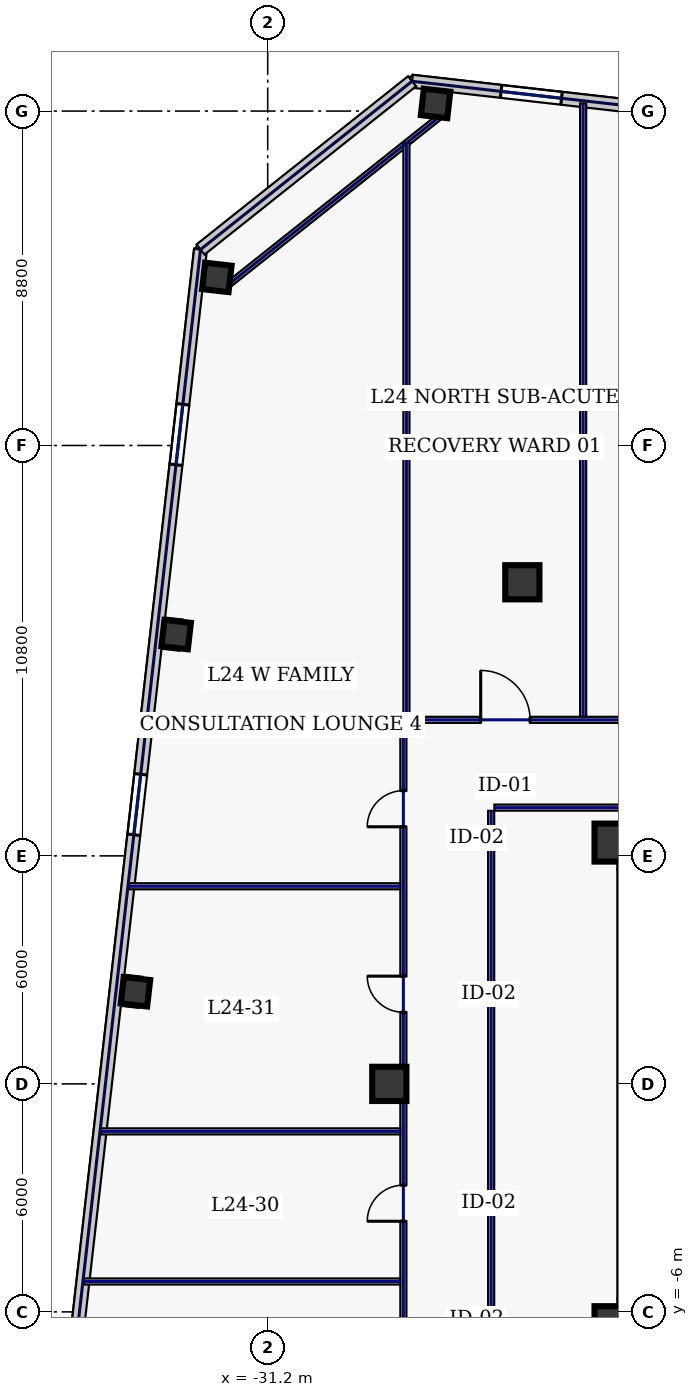
"""IFC4 building model, lengths in metres.
Left out: names, types, materials, properties, quantities, classifications, styles, units other than length and angle.
Written with IfcOpenShell. Run it as: python <this file> out.ifc"""

import sys

from ifc_helpers import new_model, si_unit, direction, frame, frame_2d, origin, origin_2d, place, context, subcontext, project, spatial, rectangle, hollow_rectangle, extrude, element, fill, save


model = new_model("IFC4")
c1 = context("Model", 3, precision=1e-05, world=origin(), true_north=direction((0.0, 1.0)))
c2 = subcontext(c1, "Body", "Model", "MODEL_VIEW")
j1 = project(units=[si_unit("LENGTHUNIT", "METRE"), si_unit("PLANEANGLEUNIT", "RADIAN")], contexts=[c1])
p1 = place(None, origin())
s1 = spatial("IfcSite", under=j1, at=p1, CompositionType="ELEMENT")
p2 = place(p1, origin())
s2 = spatial("IfcBuilding", under=s1, at=p2, CompositionType="ELEMENT")
p3 = place(p2, frame((0.0, 0.0, 109.4)))
s3 = spatial("IfcBuildingStorey", under=s2, at=p3, CompositionType="ELEMENT", Elevation=109.4)
for number, where, z_axis, x_axis in (
    (1, (-22.0, 6.0, 0.0), (0.0, 0.0, 1.0), (1.0, 0.0, 0.0)),
    (2, (-22.0, -6.0, 0.0), (0.0, 0.0, 1.0), (1.0, 0.0, 0.0)),
):
    element("IfcWall", number, at=place(p3, frame(where, z_axis=z_axis, x_axis=x_axis)), inside=s3, PredefinedType="SHEAR", context=c2, shape_type="SweptSolid", body=[
        extrude(rectangle(XDim=11.55, YDim=0.7, at=frame_2d((5.775, 0.0))), origin(), (0.0, 0.0, 1.0), 3.74),
    ])
p4 = place(p3, frame((-21.6, -5.65, 0.0), z_axis=(0.0, 0.0, 1.0), x_axis=(0.0, 1.0, 0.0)))
e3 = element("IfcWall", 3, at=p4, inside=s3, PredefinedType="SHEAR", context=c2, shape_type="SweptSolid", body=[
    extrude(rectangle(XDim=11.3, YDim=0.8, at=frame_2d((5.65, 0.0))), origin(), (0.0, 0.0, 1.0), 3.74),
])
for number, where, z_axis, x_axis in (
    (4, (-22.1, -6.35, 0.0), (0.0, 0.0, 1.0), (1.0, 0.0, 0.0)),
    (5, (-22.1, 6.35, 0.0), (0.0, 0.0, 1.0), (1.0, 0.0, 0.0)),
):
    element("IfcColumn", number, at=place(p3, frame(where, z_axis=z_axis, x_axis=x_axis)), inside=s3, PredefinedType="COLUMN", context=c2, shape_type="SweptSolid", body=[
        extrude(hollow_rectangle(XDim=1.0, YDim=1.0, WallThickness=0.045, at=origin_2d()), origin(), (0.0, 0.0, 1.0), 3.74),
    ])
for number, where, z_axis, x_axis in (
    (6, (-24.5, 13.2, 0.0), (0.0, 0.0, 1.0), (1.0, 0.0, 0.0)),
    (7, (-28.0, 0.0, 0.0), (0.0, 0.0, 1.0), (1.0, 0.0, 0.0)),
):
    element("IfcColumn", number, at=place(p3, frame(where, z_axis=z_axis, x_axis=x_axis)), inside=s3, PredefinedType="COLUMN", context=c2, shape_type="SweptSolid", body=[
        extrude(hollow_rectangle(XDim=0.9, YDim=0.9, WallThickness=0.04, at=origin_2d()), origin(), (0.0, 0.0, 1.0), 3.74),
    ])
for number, where, z_axis, x_axis in (
    (8, (-26.783, 25.801, 0.0), (0.0, 0.0, 1.0), (0.994, -0.113, 0.0)),
    (9, (-32.538, 21.223, 0.0), (0.0, 0.0, 1.0), (0.994, -0.113, 0.0)),
    (10, (-33.609, 11.824, 0.0), (0.0, 0.0, 1.0), (0.994, -0.113, 0.0)),
    (11, (-34.68, 2.425, 0.0), (0.0, 0.0, 1.0), (0.994, -0.113, 0.0)),
):
    element("IfcColumn", number, at=place(p3, frame(where, z_axis=z_axis, x_axis=x_axis)), inside=s3, PredefinedType="COLUMN", context=c2, shape_type="SweptSolid", body=[
        extrude(hollow_rectangle(XDim=0.7, YDim=0.7, WallThickness=0.032, at=origin_2d()), origin(), (0.0, 0.0, 1.0), 3.74),
    ])
p5 = place(p3, frame((-6.314, 23.982, 0.0), z_axis=(0.0, 0.0, 1.0), x_axis=(-0.993571362037, 0.113207546299, 0.0)))
e12 = element("IfcWall", 12, at=p5, inside=s3, PredefinedType="STANDARD", context=c2, shape_type="SweptSolid", body=[
    extrude(rectangle(XDim=21.223, YDim=0.34, at=frame_2d((10.611, 0.0))), origin(), (0.0, 0.0, 1.0), 3.74),
])
p6 = place(p5, frame((17.265, 0.0, 0.22)))
e13 = element("IfcOpeningElement", 13, at=p6, cuts=e12, PredefinedType="OPENING", context=c2, shape_type="SweptSolid", body=[
    extrude(rectangle(XDim=1.6, YDim=1.2, at=frame_2d((0.8, 0.6))), frame((0.0, 0.18, 0.0), z_axis=(0.0, -1.0, 0.0), x_axis=(1.0, 0.0, 0.0)), (0.0, 0.0, 1.0), 0.36),
])
p7 = place(p5, frame((13.044, 0.0, 0.22)))
e14 = element("IfcOpeningElement", 14, at=p7, cuts=e12, PredefinedType="OPENING", context=c2, shape_type="SweptSolid", body=[
    extrude(rectangle(XDim=1.6, YDim=1.2, at=frame_2d((0.8, 0.6))), frame((0.0, 0.18, 0.0), z_axis=(0.0, -1.0, 0.0), x_axis=(1.0, 0.0, 0.0)), (0.0, 0.0, 1.0), 0.36),
])
p8 = place(p5, frame((8.088, 0.0, 0.22)))
e15 = element("IfcOpeningElement", 15, at=p8, cuts=e12, PredefinedType="OPENING", context=c2, shape_type="SweptSolid", body=[
    extrude(rectangle(XDim=1.6, YDim=1.2, at=frame_2d((0.8, 0.6))), frame((0.0, 0.18, 0.0), z_axis=(0.0, -1.0, 0.0), x_axis=(1.0, 0.0, 0.0)), (0.0, 0.0, 1.0), 0.36),
])
p9 = place(p5, frame((3.866, 0.0, 0.22)))
e16 = element("IfcOpeningElement", 16, at=p9, cuts=e12, PredefinedType="OPENING", context=c2, shape_type="SweptSolid", body=[
    extrude(rectangle(XDim=1.6, YDim=1.2, at=frame_2d((0.8, 0.6))), frame((0.0, 0.18, 0.0), z_axis=(0.0, -1.0, 0.0), x_axis=(1.0, 0.0, 0.0)), (0.0, 0.0, 1.0), 0.36),
])
p10 = place(p3, frame((-32.968, 21.957, 0.0), z_axis=(0.0, 0.0, 1.0), x_axis=(-0.113201605824, -0.993572038877, 0.0)))
e17 = element("IfcWall", 17, at=p10, inside=s3, PredefinedType="STANDARD", context=c2, shape_type="SweptSolid", body=[
    extrude(rectangle(XDim=39.2, YDim=0.34, at=frame_2d((19.6, 0.0))), origin(), (0.0, 0.0, 1.0), 3.74),
])
p11 = place(p10, frame((4.1, 0.0, 0.22)))
e18 = element("IfcOpeningElement", 18, at=p11, cuts=e17, PredefinedType="OPENING", context=c2, shape_type="SweptSolid", body=[
    extrude(rectangle(XDim=1.6, YDim=1.2, at=frame_2d((0.8, 0.6))), frame((0.0, 0.18, 0.0), z_axis=(0.0, -1.0, 0.0), x_axis=(1.0, 0.0, 0.0)), (0.0, 0.0, 1.0), 0.36),
])
p12 = place(p10, frame((13.9, 0.0, 0.22)))
e19 = element("IfcOpeningElement", 19, at=p12, cuts=e17, PredefinedType="OPENING", context=c2, shape_type="SweptSolid", body=[
    extrude(rectangle(XDim=1.6, YDim=1.2, at=frame_2d((0.8, 0.6))), frame((0.0, 0.18, 0.0), z_axis=(0.0, -1.0, 0.0), x_axis=(1.0, 0.0, 0.0)), (0.0, 0.0, 1.0), 0.36),
])
p13 = place(p10, frame((33.5, 0.0, 0.22)))
e20 = element("IfcOpeningElement", 20, at=p13, cuts=e17, PredefinedType="OPENING", context=c2, shape_type="SweptSolid", body=[
    extrude(rectangle(XDim=1.6, YDim=1.2, at=frame_2d((0.8, 0.6))), frame((0.0, 0.18, 0.0), z_axis=(0.0, -1.0, 0.0), x_axis=(1.0, 0.0, 0.0)), (0.0, 0.0, 1.0), 0.36),
])
p14 = place(p3, frame((-27.401, 26.385, 0.0), z_axis=(0.0, 0.0, 1.0), x_axis=(-0.78261359446, -0.622507800567, 0.0)))
e21 = element("IfcWall", 21, at=p14, inside=s3, PredefinedType="STANDARD", context=c2, shape_type="SweptSolid", body=[
    extrude(rectangle(XDim=7.114, YDim=0.34, at=frame_2d((3.557, 0.0))), origin(), (0.0, 0.0, 1.0), 3.74),
])
p15 = place(p3, frame((-26.571, 25.535, 0.0), z_axis=(0.0, 0.0, 1.0), x_axis=(-0.782617962887, -0.622502308564, 0.0)))
e22 = element("IfcWall", 22, at=p15, inside=s3, PredefinedType="PARTITIONING", context=c2, shape_type="SweptSolid", body=[
    extrude(rectangle(XDim=7.354, YDim=0.16, at=frame_2d((3.677, 0.0))), origin(), (0.0, 0.0, 1.0), 1.535),
])
p16 = place(p3, frame((-27.63, -9.215, 0.0), z_axis=(0.0, 0.0, 1.0), x_axis=(0.0, 1.0, 0.0)))
e23 = element("IfcWall", 23, at=p16, inside=s3, PredefinedType="PARTITIONING", context=c2, shape_type="SweptSolid", body=[
    extrude(rectangle(XDim=18.63, YDim=0.16, at=frame_2d((9.315, 0.0))), origin(), (0.0, 0.0, 1.0), 3.74),
])
p17 = place(p16, frame((1.769, 0.0, 0.0)))
e24 = element("IfcOpeningElement", 24, at=p17, cuts=e23, PredefinedType="OPENING", context=c2, shape_type="SweptSolid", body=[
    extrude(rectangle(XDim=0.95, YDim=2.2, at=frame_2d((0.475, 1.1))), frame((0.0, 0.09, 0.0), z_axis=(0.0, -1.0, 0.0), x_axis=(1.0, 0.0, 0.0)), (0.0, 0.0, 1.0), 0.18),
])
p18 = place(p16, frame((5.6, 0.0, 0.0)))
e25 = element("IfcOpeningElement", 25, at=p18, cuts=e23, PredefinedType="OPENING", context=c2, shape_type="SweptSolid", body=[
    extrude(rectangle(XDim=0.95, YDim=2.2, at=frame_2d((0.475, 1.1))), frame((0.0, 0.09, 0.0), z_axis=(0.0, -1.0, 0.0), x_axis=(1.0, 0.0, 0.0)), (0.0, 0.0, 1.0), 0.18),
])
p19 = place(p16, frame((11.1, 0.0, 0.0)))
e26 = element("IfcOpeningElement", 26, at=p19, cuts=e23, PredefinedType="OPENING", context=c2, shape_type="SweptSolid", body=[
    extrude(rectangle(XDim=0.95, YDim=2.2, at=frame_2d((0.475, 1.1))), frame((0.0, 0.09, 0.0), z_axis=(0.0, -1.0, 0.0), x_axis=(1.0, 0.0, 0.0)), (0.0, 0.0, 1.0), 0.18),
])
p20 = place(p16, frame((15.981, 0.0, 0.0)))
e27 = element("IfcOpeningElement", 27, at=p20, cuts=e23, PredefinedType="OPENING", context=c2, shape_type="SweptSolid", body=[
    extrude(rectangle(XDim=0.95, YDim=2.2, at=frame_2d((0.475, 1.1))), frame((0.0, 0.09, 0.0), z_axis=(0.0, -1.0, 0.0), x_axis=(1.0, 0.0, 0.0)), (0.0, 0.0, 1.0), 0.18),
])
p21 = place(p3, frame((-27.465, 9.58, 0.0), z_axis=(0.0, 0.0, 1.0), x_axis=(1.0, 0.0, 0.0)))
e28 = element("IfcWall", 28, at=p21, inside=s3, PredefinedType="PARTITIONING", context=c2, shape_type="SweptSolid", body=[
    extrude(rectangle(XDim=54.93, YDim=0.16, at=frame_2d((27.465, 0.0))), origin(), (0.0, 0.0, 1.0), 3.74),
])
p22 = place(p21, frame((1.869, 0.0, 0.0)))
e29 = element("IfcOpeningElement", 29, at=p22, cuts=e28, PredefinedType="OPENING", context=c2, shape_type="SweptSolid", body=[
    extrude(rectangle(XDim=1.3, YDim=2.2, at=frame_2d((0.65, 1.1))), frame((0.0, 0.09, 0.0), z_axis=(0.0, -1.0, 0.0), x_axis=(1.0, 0.0, 0.0)), (0.0, 0.0, 1.0), 0.18),
])
p23 = place(p21, frame((6.375, 0.0, 0.0)))
e30 = element("IfcOpeningElement", 30, at=p23, cuts=e28, PredefinedType="OPENING", context=c2, shape_type="SweptSolid", body=[
    extrude(rectangle(XDim=0.95, YDim=2.2, at=frame_2d((0.475, 1.1))), frame((0.0, 0.09, 0.0), z_axis=(0.0, -1.0, 0.0), x_axis=(1.0, 0.0, 0.0)), (0.0, 0.0, 1.0), 0.18),
])
p24 = place(p21, frame((13.1, 0.0, 0.0)))
e31 = element("IfcOpeningElement", 31, at=p24, cuts=e28, PredefinedType="OPENING", context=c2, shape_type="SweptSolid", body=[
    extrude(rectangle(XDim=1.3, YDim=2.2, at=frame_2d((0.65, 1.1))), frame((0.0, 0.09, 0.0), z_axis=(0.0, -1.0, 0.0), x_axis=(1.0, 0.0, 0.0)), (0.0, 0.0, 1.0), 0.18),
])
p25 = place(p21, frame((23.225, 0.0, 0.0)))
e32 = element("IfcOpeningElement", 32, at=p25, cuts=e28, PredefinedType="OPENING", context=c2, shape_type="SweptSolid", body=[
    extrude(rectangle(XDim=0.95, YDim=2.2, at=frame_2d((0.475, 1.1))), frame((0.0, 0.09, 0.0), z_axis=(0.0, -1.0, 0.0), x_axis=(1.0, 0.0, 0.0)), (0.0, 0.0, 1.0), 0.18),
])
p26 = place(p21, frame((33.725, 0.0, 0.0)))
e33 = element("IfcOpeningElement", 33, at=p26, cuts=e28, PredefinedType="OPENING", context=c2, shape_type="SweptSolid", body=[
    extrude(rectangle(XDim=0.95, YDim=2.2, at=frame_2d((0.475, 1.1))), frame((0.0, 0.09, 0.0), z_axis=(0.0, -1.0, 0.0), x_axis=(1.0, 0.0, 0.0)), (0.0, 0.0, 1.0), 0.18),
])
p27 = place(p21, frame((43.325, 0.0, 0.0)))
e34 = element("IfcOpeningElement", 34, at=p27, cuts=e28, PredefinedType="OPENING", context=c2, shape_type="SweptSolid", body=[
    extrude(rectangle(XDim=1.05, YDim=2.2, at=frame_2d((0.525, 1.1))), frame((0.0, 0.09, 0.0), z_axis=(0.0, -1.0, 0.0), x_axis=(1.0, 0.0, 0.0)), (0.0, 0.0, 1.0), 0.18),
])
p28 = place(p21, frame((50.781, 0.0, 0.0)))
e35 = element("IfcOpeningElement", 35, at=p28, cuts=e28, PredefinedType="OPENING", context=c2, shape_type="SweptSolid", body=[
    extrude(rectangle(XDim=1.3, YDim=2.2, at=frame_2d((0.65, 1.1))), frame((0.0, 0.09, 0.0), z_axis=(0.0, -1.0, 0.0), x_axis=(1.0, 0.0, 0.0)), (0.0, 0.0, 1.0), 0.18),
])
p29 = place(p3, frame((-10.665, 7.27, 0.0), z_axis=(0.0, 0.0, 1.0), x_axis=(-1.0, 0.0, 0.0)))
e36 = element("IfcWall", 36, at=p29, inside=s3, PredefinedType="PARTITIONING", context=c2, shape_type="SweptSolid", body=[
    extrude(rectangle(XDim=14.57, YDim=0.16, at=frame_2d((7.285, 0.0))), origin(), (0.0, 0.0, 1.0), 3.74),
])
p30 = place(p3, frame((-25.32, 7.185, 0.0), z_axis=(0.0, 0.0, 1.0), x_axis=(0.0, -1.0, 0.0)))
e37 = element("IfcWall", 37, at=p30, inside=s3, PredefinedType="PARTITIONING", context=c2, shape_type="SweptSolid", body=[
    extrude(rectangle(XDim=14.17, YDim=0.16, at=frame_2d((7.085, 0.0))), origin(), (0.0, 0.0, 1.0), 3.74),
])
p31 = place(p3, frame((-27.55, 9.665, 0.0), z_axis=(0.0, 0.0, 1.0), x_axis=(0.0, 1.0, 0.0)))
e38 = element("IfcWall", 38, at=p31, inside=s3, PredefinedType="PARTITIONING", context=c2, shape_type="SweptSolid", body=[
    extrude(rectangle(XDim=15.109, YDim=0.16, at=frame_2d((7.554, 0.0))), origin(), (0.0, 0.0, 1.0), 3.74),
])
p32 = place(p3, frame((-22.9, 9.665, 0.0), z_axis=(0.0, 0.0, 1.0), x_axis=(0.0, 1.0, 0.0)))
e39 = element("IfcWall", 39, at=p32, inside=s3, PredefinedType="PARTITIONING", context=c2, shape_type="SweptSolid", body=[
    extrude(rectangle(XDim=16.136, YDim=0.16, at=frame_2d((8.068, 0.0))), origin(), (0.0, 0.0, 1.0), 3.74),
])
p33 = place(p3, frame((-36.042, -5.2, 0.0), z_axis=(0.0, 0.0, 1.0), x_axis=(1.0, 0.0, 0.0)))
e40 = element("IfcWall", 40, at=p33, inside=s3, PredefinedType="PARTITIONING", context=c2, shape_type="SweptSolid", body=[
    extrude(rectangle(XDim=8.327, YDim=0.16, at=frame_2d((4.164, 0.0))), origin(), (0.0, 0.0, 1.0), 3.74),
])
p34 = place(p3, frame((-35.592, -1.25, 0.0), z_axis=(0.0, 0.0, 1.0), x_axis=(1.0, 0.0, 0.0)))
e41 = element("IfcWall", 41, at=p34, inside=s3, PredefinedType="PARTITIONING", context=c2, shape_type="SweptSolid", body=[
    extrude(rectangle(XDim=7.877, YDim=0.16, at=frame_2d((3.938, 0.0))), origin(), (0.0, 0.0, 1.0), 3.74),
])
p35 = place(p3, frame((-34.857, 5.2, 0.0), z_axis=(0.0, 0.0, 1.0), x_axis=(1.0, 0.0, 0.0)))
e42 = element("IfcWall", 42, at=p35, inside=s3, PredefinedType="PARTITIONING", context=c2, shape_type="SweptSolid", body=[
    extrude(rectangle(XDim=7.142, YDim=0.16, at=frame_2d((3.571, 0.0))), origin(), (0.0, 0.0, 1.0), 3.74),
])
p36 = place(p6, origin())
e43 = element("IfcWindow", 43, at=p36, inside=s3, PartitioningType="SINGLE_PANEL", PredefinedType="WINDOW", context=c2, shape_type="SweptSolid", body=[
    extrude(rectangle(XDim=1.6, YDim=1.2, at=frame_2d((0.8, 0.6))), frame((0.0, 0.03, 0.0), z_axis=(0.0, -1.0, 0.0), x_axis=(1.0, 0.0, 0.0)), (0.0, 0.0, 1.0), 0.06),
])
fill(e13, e43)
p37 = place(p11, origin())
e44 = element("IfcWindow", 44, at=p37, inside=s3, PartitioningType="SINGLE_PANEL", PredefinedType="WINDOW", context=c2, shape_type="SweptSolid", body=[
    extrude(rectangle(XDim=1.6, YDim=1.2, at=frame_2d((0.8, 0.6))), frame((0.0, 0.03, 0.0), z_axis=(0.0, -1.0, 0.0), x_axis=(1.0, 0.0, 0.0)), (0.0, 0.0, 1.0), 0.06),
])
fill(e18, e44)
p38 = place(p12, origin())
e45 = element("IfcWindow", 45, at=p38, inside=s3, PartitioningType="SINGLE_PANEL", PredefinedType="WINDOW", context=c2, shape_type="SweptSolid", body=[
    extrude(rectangle(XDim=1.6, YDim=1.2, at=frame_2d((0.8, 0.6))), frame((0.0, 0.03, 0.0), z_axis=(0.0, -1.0, 0.0), x_axis=(1.0, 0.0, 0.0)), (0.0, 0.0, 1.0), 0.06),
])
fill(e19, e45)
p39 = place(p22, origin())
e46 = element("IfcDoor", 46, at=p39, inside=s3, OperationType="SINGLE_SWING_LEFT", PredefinedType="DOOR", context=c2, shape_type="SweptSolid", body=[
    extrude(rectangle(XDim=1.3, YDim=2.2, at=frame_2d((0.65, 1.1))), frame((0.0, 0.025, 0.0), z_axis=(0.0, -1.0, 0.0), x_axis=(1.0, 0.0, 0.0)), (0.0, 0.0, 1.0), 0.05),
])
fill(e29, e46)
p40 = place(p18, origin())
e47 = element("IfcDoor", 47, at=p40, inside=s3, OperationType="SINGLE_SWING_LEFT", PredefinedType="DOOR", context=c2, shape_type="SweptSolid", body=[
    extrude(rectangle(XDim=0.95, YDim=2.2, at=frame_2d((0.475, 1.1))), frame((0.0, 0.025, 0.0), z_axis=(0.0, -1.0, 0.0), x_axis=(1.0, 0.0, 0.0)), (0.0, 0.0, 1.0), 0.05),
])
fill(e25, e47)
p41 = place(p19, origin())
e48 = element("IfcDoor", 48, at=p41, inside=s3, OperationType="SINGLE_SWING_RIGHT", PredefinedType="DOOR", context=c2, shape_type="SweptSolid", body=[
    extrude(rectangle(XDim=0.95, YDim=2.2, at=frame_2d((0.475, 1.1))), frame((0.0, 0.025, 0.0), z_axis=(0.0, -1.0, 0.0), x_axis=(1.0, 0.0, 0.0)), (0.0, 0.0, 1.0), 0.05),
])
fill(e26, e48)
p42 = place(p20, origin())
e49 = element("IfcDoor", 49, at=p42, inside=s3, OperationType="SINGLE_SWING_LEFT", PredefinedType="DOOR", context=c2, shape_type="SweptSolid", body=[
    extrude(rectangle(XDim=0.95, YDim=2.2, at=frame_2d((0.475, 1.1))), frame((0.0, 0.025, 0.0), z_axis=(0.0, -1.0, 0.0), x_axis=(1.0, 0.0, 0.0)), (0.0, 0.0, 1.0), 0.05),
])
fill(e27, e49)
save(model, sys.argv[1])
